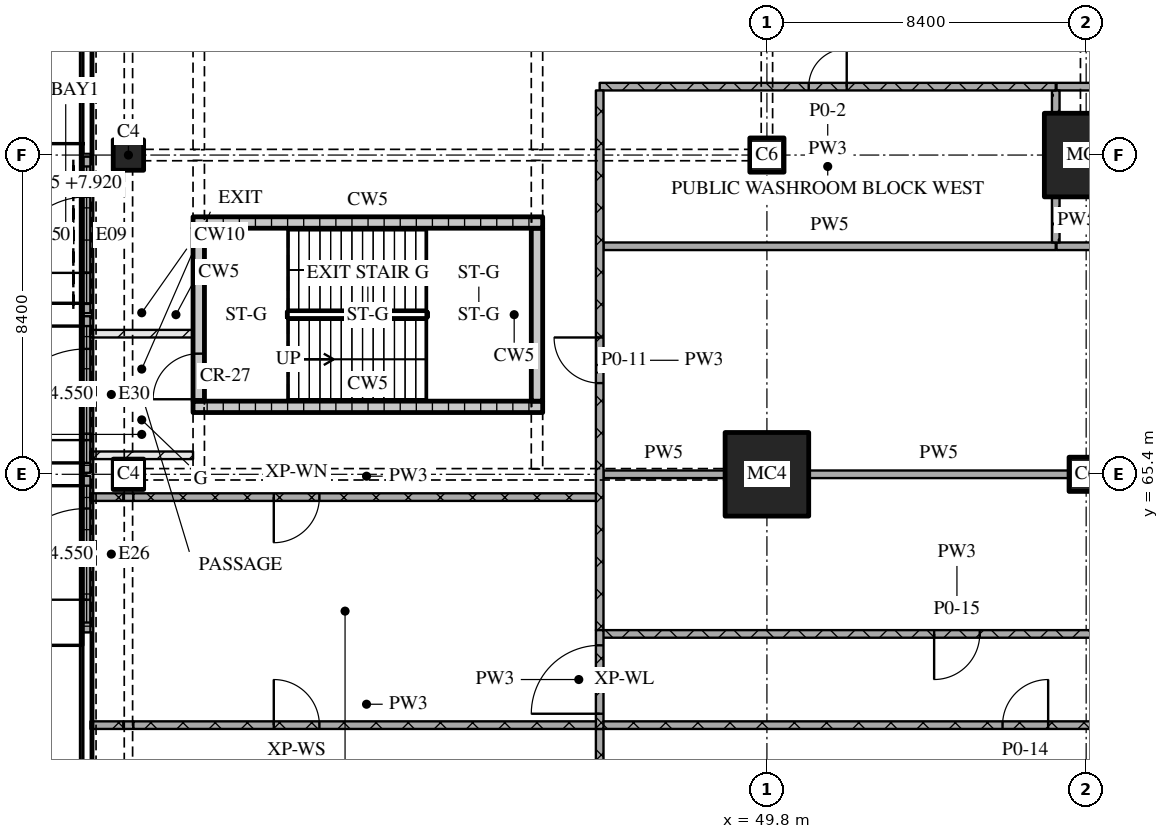
"""IFC4 building model, lengths in metres.
Left out: names, types, materials, properties, quantities, classifications, styles, units other than length and angle.
Written with IfcOpenShell. Run it as: python <this file> out.ifc"""

import sys

from ifc_helpers import new_model, si_unit, direction, frame, frame_2d, origin, origin_2d, place, context, subcontext, project, spatial, rectangle, extrude, element, fill, save


model = new_model("IFC4")
c1 = context("Model", 3, precision=1e-05, world=origin(), true_north=direction((0.0, 1.0)))
c2 = subcontext(c1, "Body", "Model", "MODEL_VIEW")
j1 = project(units=[si_unit("LENGTHUNIT", "METRE"), si_unit("PLANEANGLEUNIT", "RADIAN")], contexts=[c1])
p1 = place(None, origin())
s1 = spatial("IfcSite", under=j1, at=p1, CompositionType="ELEMENT")
p2 = place(p1, origin())
s2 = spatial("IfcBuilding", under=s1, at=p2, CompositionType="ELEMENT")
p3 = place(p2, origin())
s3 = spatial("IfcBuildingStorey", under=s2, at=p3, CompositionType="ELEMENT", Elevation=0.0)
p4 = place(p3, frame((49.8, 65.4, 0.0), z_axis=(0.0, 0.0, 1.0), x_axis=(1.0, 0.0, 0.0)))
e1 = element("IfcColumn", 1, at=p4, inside=s3, PredefinedType="COLUMN", context=c2, shape_type="SweptSolid", body=[
    extrude(rectangle(XDim=2.2, YDim=2.2, at=origin_2d()), origin(), (0.0, 0.0, 1.0), 9.0),
])
for number, where, z_axis, x_axis in (
    (2, (49.8, 73.8, 0.0), (0.0, 0.0, 1.0), (1.0, 0.0, 0.0)),
    (3, (58.2, 65.4, 0.0), (0.0, 0.0, 1.0), (1.0, 0.0, 0.0)),
):
    element("IfcColumn", number, at=place(p3, frame(where, z_axis=z_axis, x_axis=x_axis)), inside=s3, PredefinedType="COLUMN", context=c2, shape_type="SweptSolid", body=[
        extrude(rectangle(XDim=0.9, YDim=0.9, at=origin_2d()), origin(), (0.0, 0.0, 1.0), 9.0),
    ])
p5 = place(p3, frame((58.2, 73.8, 0.0), z_axis=(0.0, 0.0, 1.0), x_axis=(1.0, 0.0, 0.0)))
e4 = element("IfcColumn", 4, at=p5, inside=s3, PredefinedType="COLUMN", context=c2, shape_type="SweptSolid", body=[
    extrude(rectangle(XDim=2.2, YDim=2.2, at=origin_2d()), origin(), (0.0, 0.0, 1.0), 9.0),
])
for number, where, z_axis, x_axis in (
    (5, (33.0, 65.4, 0.0), (0.0, 0.0, 1.0), (1.0, 0.0, 0.0)),
    (6, (33.0, 73.8, 0.0), (0.0, 0.0, 1.0), (1.0, 0.0, 0.0)),
):
    element("IfcColumn", number, at=place(p3, frame(where, z_axis=z_axis, x_axis=x_axis)), inside=s3, PredefinedType="COLUMN", context=c2, shape_type="SweptSolid", body=[
        extrude(rectangle(XDim=0.8, YDim=0.8, at=origin_2d()), origin(), (0.0, 0.0, 1.0), 9.0),
    ])
p6 = place(p3, frame((31.9, 69.64, 0.0), z_axis=(0.0, 0.0, 1.0), x_axis=(0.0, 1.0, 0.0)))
e7 = element("IfcWall", 7, at=p6, inside=s3, PredefinedType="SOLIDWALL", context=c2, shape_type="SweptSolid", body=[
    extrude(rectangle(XDim=4.12, YDim=0.2, at=frame_2d((2.06, 0.0))), origin(), (0.0, 0.0, 1.0), 8.7),
])
p7 = place(p6, frame((1.06, 0.0, 0.0)))
e8 = element("IfcOpeningElement", 8, at=p7, cuts=e7, PredefinedType="OPENING", context=c2, shape_type="SweptSolid", body=[
    extrude(rectangle(XDim=2.0, YDim=2.4, at=frame_2d((1.0, 1.2))), frame((0.0, 0.11, 0.0), z_axis=(0.0, -1.0, 0.0), x_axis=(1.0, 0.0, 0.0)), (0.0, 0.0, 1.0), 0.22),
])
p8 = place(p6, frame((0.26, 0.0, 2.7)))
e9 = element("IfcOpeningElement", 9, at=p8, cuts=e7, PredefinedType="OPENING", context=c2, shape_type="SweptSolid", body=[
    extrude(rectangle(XDim=3.6, YDim=5.6, at=frame_2d((1.8, 2.8))), frame((0.0, 0.11, 0.0), z_axis=(0.0, -1.0, 0.0), x_axis=(1.0, 0.0, 0.0)), (0.0, 0.0, 1.0), 0.22),
])
p9 = place(p3, frame((31.9, 61.24, 0.0), z_axis=(0.0, 0.0, 1.0), x_axis=(0.0, 1.0, 0.0)))
e10 = element("IfcWall", 10, at=p9, inside=s3, PredefinedType="SOLIDWALL", context=c2, shape_type="SweptSolid", body=[
    extrude(rectangle(XDim=4.12, YDim=0.2, at=frame_2d((2.06, 0.0))), origin(), (0.0, 0.0, 1.0), 8.7),
])
p10 = place(p9, frame((0.86, 0.0, 0.0)))
e11 = element("IfcOpeningElement", 11, at=p10, cuts=e10, PredefinedType="OPENING", context=c2, shape_type="SweptSolid", body=[
    extrude(rectangle(XDim=2.4, YDim=2.4, at=frame_2d((1.2, 1.2))), frame((0.0, 0.11, 0.0), z_axis=(0.0, -1.0, 0.0), x_axis=(1.0, 0.0, 0.0)), (0.0, 0.0, 1.0), 0.22),
])
p11 = place(p9, frame((0.26, 0.0, 2.7)))
e12 = element("IfcOpeningElement", 12, at=p11, cuts=e10, PredefinedType="OPENING", context=c2, shape_type="SweptSolid", body=[
    extrude(rectangle(XDim=3.6, YDim=5.6, at=frame_2d((1.8, 2.8))), frame((0.0, 0.11, 0.0), z_axis=(0.0, -1.0, 0.0), x_axis=(1.0, 0.0, 0.0)), (0.0, 0.0, 1.0), 0.22),
])
p12 = place(p3, frame((31.9, 65.44, 0.0), z_axis=(0.0, 0.0, 1.0), x_axis=(0.0, 1.0, 0.0)))
e13 = element("IfcWall", 13, at=p12, inside=s3, PredefinedType="SOLIDWALL", context=c2, shape_type="SweptSolid", body=[
    extrude(rectangle(XDim=4.12, YDim=0.2, at=frame_2d((2.06, 0.0))), origin(), (0.0, 0.0, 1.0), 8.7),
])
p13 = place(p12, frame((0.86, 0.0, 0.0)))
e14 = element("IfcOpeningElement", 14, at=p13, cuts=e13, PredefinedType="OPENING", context=c2, shape_type="SweptSolid", body=[
    extrude(rectangle(XDim=2.4, YDim=2.4, at=frame_2d((1.2, 1.2))), frame((0.0, 0.11, 0.0), z_axis=(0.0, -1.0, 0.0), x_axis=(1.0, 0.0, 0.0)), (0.0, 0.0, 1.0), 0.22),
])
p14 = place(p12, frame((0.26, 0.0, 2.7)))
e15 = element("IfcOpeningElement", 15, at=p14, cuts=e13, PredefinedType="OPENING", context=c2, shape_type="SweptSolid", body=[
    extrude(rectangle(XDim=3.6, YDim=5.6, at=frame_2d((1.8, 2.8))), frame((0.0, 0.11, 0.0), z_axis=(0.0, -1.0, 0.0), x_axis=(1.0, 0.0, 0.0)), (0.0, 0.0, 1.0), 0.22),
])
p15 = place(p3, frame((34.7, 67.175, 0.0), z_axis=(0.0, 0.0, 1.0), x_axis=(1.0, 0.0, 0.0)))
e16 = element("IfcWall", 16, at=p15, inside=s3, PredefinedType="SOLIDWALL", context=c2, shape_type="SweptSolid", body=[
    extrude(rectangle(XDim=9.2, YDim=0.3, at=frame_2d((4.6, 0.0))), origin(), (0.0, 0.0, 1.0), 8.7),
])
p16 = place(p3, frame((34.85, 67.325, 0.0), z_axis=(0.0, 0.0, 1.0), x_axis=(0.0, 1.0, 0.0)))
e17 = element("IfcWall", 17, at=p16, inside=s3, PredefinedType="SOLIDWALL", context=c2, shape_type="SweptSolid", body=[
    extrude(rectangle(XDim=4.55, YDim=0.3, at=frame_2d((2.275, 0.0))), origin(), (0.0, 0.0, 1.0), 8.7),
])
p17 = place(p16, frame((0.05, 0.0, 0.0)))
e18 = element("IfcOpeningElement", 18, at=p17, cuts=e17, PredefinedType="OPENING", context=c2, shape_type="SweptSolid", body=[
    extrude(rectangle(XDim=1.2, YDim=2.1, at=frame_2d((0.6, 1.05))), frame((0.0, 0.16, 0.0), z_axis=(0.0, -1.0, 0.0), x_axis=(1.0, 0.0, 0.0)), (0.0, 0.0, 1.0), 0.32),
])
p18 = place(p3, frame((43.75, 67.325, 0.0), z_axis=(0.0, 0.0, 1.0), x_axis=(0.0, 1.0, 0.0)))
e19 = element("IfcWall", 19, at=p18, inside=s3, PredefinedType="SOLIDWALL", context=c2, shape_type="SweptSolid", body=[
    extrude(rectangle(XDim=4.55, YDim=0.3, at=frame_2d((2.275, 0.0))), origin(), (0.0, 0.0, 1.0), 8.7),
])
p19 = place(p3, frame((34.7, 72.025, 0.0), z_axis=(0.0, 0.0, 1.0), x_axis=(1.0, 0.0, 0.0)))
e20 = element("IfcWall", 20, at=p19, inside=s3, PredefinedType="SOLIDWALL", context=c2, shape_type="SweptSolid", body=[
    extrude(rectangle(XDim=9.2, YDim=0.3, at=frame_2d((4.6, 0.0))), origin(), (0.0, 0.0, 1.0), 8.7),
])
for number, where, z_axis, x_axis in (
    (21, (32.0, 65.9, 0.0), (0.0, 0.0, 1.0), (1.0, 0.0, 0.0)),
    (22, (32.0, 69.1, 0.0), (0.0, 0.0, 1.0), (1.0, 0.0, 0.0)),
):
    element("IfcWall", number, at=place(p3, frame(where, z_axis=z_axis, x_axis=x_axis)), inside=s3, PredefinedType="PARTITIONING", context=c2, shape_type="SweptSolid", body=[
        extrude(rectangle(XDim=2.7, YDim=0.2, at=frame_2d((1.35, 0.0))), origin(), (0.0, 0.0, 1.0), 8.7),
    ])
p20 = place(p3, frame((32.0, 58.8, 0.0), z_axis=(0.0, 0.0, 1.0), x_axis=(1.0, 0.0, 0.0)))
e23 = element("IfcWall", 23, at=p20, inside=s3, PredefinedType="PARTITIONING", context=c2, shape_type="SweptSolid", body=[
    extrude(rectangle(XDim=0.87, YDim=0.2, at=frame_2d((0.435, 0.0))), origin(), (0.0, 0.0, 1.0), 8.7),
])
p21 = place(p3, frame((32.87, 58.8, 0.0), z_axis=(0.0, 0.0, 1.0), x_axis=(1.0, 0.0, 0.0)))
e24 = element("IfcWall", 24, at=p21, inside=s3, PredefinedType="PARTITIONING", context=c2, shape_type="SweptSolid", body=[
    extrude(rectangle(XDim=0.26, YDim=0.2, at=frame_2d((0.13, 0.0))), origin(), (0.0, 0.0, 1.0), 8.1),
])
p22 = place(p3, frame((33.13, 58.8, 0.0), z_axis=(0.0, 0.0, 1.0), x_axis=(1.0, 0.0, 0.0)))
e25 = element("IfcWall", 25, at=p22, inside=s3, PredefinedType="PARTITIONING", context=c2, shape_type="SweptSolid", body=[
    extrude(rectangle(XDim=12.27, YDim=0.2, at=frame_2d((6.135, 0.0))), origin(), (0.0, 0.0, 1.0), 8.7),
])
p23 = place(p22, frame((3.695, 0.0, 0.0)))
e26 = element("IfcOpeningElement", 26, at=p23, cuts=e25, PredefinedType="OPENING", context=c2, shape_type="SweptSolid", body=[
    extrude(rectangle(XDim=1.2, YDim=2.1, at=frame_2d((0.6, 1.05))), frame((0.0, 0.11, 0.0), z_axis=(0.0, -1.0, 0.0), x_axis=(1.0, 0.0, 0.0)), (0.0, 0.0, 1.0), 0.22),
])
p24 = place(p3, frame((32.0, 64.8, 0.0), z_axis=(0.0, 0.0, 1.0), x_axis=(1.0, 0.0, 0.0)))
e27 = element("IfcWall", 27, at=p24, inside=s3, PredefinedType="PARTITIONING", context=c2, shape_type="SweptSolid", body=[
    extrude(rectangle(XDim=0.87, YDim=0.2, at=frame_2d((0.435, 0.0))), origin(), (0.0, 0.0, 1.0), 8.7),
])
p25 = place(p3, frame((32.87, 64.8, 0.0), z_axis=(0.0, 0.0, 1.0), x_axis=(1.0, 0.0, 0.0)))
e28 = element("IfcWall", 28, at=p25, inside=s3, PredefinedType="PARTITIONING", context=c2, shape_type="SweptSolid", body=[
    extrude(rectangle(XDim=0.26, YDim=0.2, at=frame_2d((0.13, 0.0))), origin(), (0.0, 0.0, 1.0), 8.1),
])
p26 = place(p3, frame((33.13, 64.8, 0.0), z_axis=(0.0, 0.0, 1.0), x_axis=(1.0, 0.0, 0.0)))
e29 = element("IfcWall", 29, at=p26, inside=s3, PredefinedType="PARTITIONING", context=c2, shape_type="SweptSolid", body=[
    extrude(rectangle(XDim=12.27, YDim=0.2, at=frame_2d((6.135, 0.0))), origin(), (0.0, 0.0, 1.0), 8.7),
])
p27 = place(p26, frame((3.695, 0.0, 0.0)))
e30 = element("IfcOpeningElement", 30, at=p27, cuts=e29, PredefinedType="OPENING", context=c2, shape_type="SweptSolid", body=[
    extrude(rectangle(XDim=1.2, YDim=2.1, at=frame_2d((0.6, 1.05))), frame((0.0, 0.11, 0.0), z_axis=(0.0, -1.0, 0.0), x_axis=(1.0, 0.0, 0.0)), (0.0, 0.0, 1.0), 0.22),
])
p28 = place(p3, frame((73.8, 58.8, 0.0), z_axis=(0.0, 0.0, 1.0), x_axis=(-1.0, 0.0, 0.0)))
e31 = element("IfcWall", 31, at=p28, inside=s3, PredefinedType="PARTITIONING", context=c2, shape_type="SweptSolid", body=[
    extrude(rectangle(XDim=28.4, YDim=0.2, at=frame_2d((14.2, 0.0))), origin(), (0.0, 0.0, 1.0), 8.7),
])
p29 = place(p28, frame((16.6, 0.0, 0.0)))
e32 = element("IfcOpeningElement", 32, at=p29, cuts=e31, PredefinedType="OPENING", context=c2, shape_type="SweptSolid", body=[
    extrude(rectangle(XDim=1.2, YDim=2.1, at=frame_2d((0.6, 1.05))), frame((0.0, 0.11, 0.0), z_axis=(0.0, -1.0, 0.0), x_axis=(1.0, 0.0, 0.0)), (0.0, 0.0, 1.0), 0.22),
])
p30 = place(p3, frame((45.4, 61.2, 0.0), z_axis=(0.0, 0.0, 1.0), x_axis=(1.0, 0.0, 0.0)))
e33 = element("IfcWall", 33, at=p30, inside=s3, PredefinedType="PARTITIONING", context=c2, shape_type="SweptSolid", body=[
    extrude(rectangle(XDim=18.8, YDim=0.2, at=frame_2d((9.4, 0.0))), origin(), (0.0, 0.0, 1.0), 8.7),
])
p31 = place(p30, frame((8.8, 0.0, 0.0)))
e34 = element("IfcOpeningElement", 34, at=p31, cuts=e33, PredefinedType="OPENING", context=c2, shape_type="SweptSolid", body=[
    extrude(rectangle(XDim=1.2, YDim=2.1, at=frame_2d((0.6, 1.05))), frame((0.0, 0.11, 0.0), z_axis=(0.0, -1.0, 0.0), x_axis=(1.0, 0.0, 0.0)), (0.0, 0.0, 1.0), 0.22),
])
p32 = place(p3, frame((45.5, 65.4, 0.0), z_axis=(0.0, 0.0, 1.0), x_axis=(1.0, 0.0, 0.0)))
e35 = element("IfcWall", 35, at=p32, inside=s3, PredefinedType="PARTITIONING", context=c2, shape_type="SweptSolid", body=[
    extrude(rectangle(XDim=3.18, YDim=0.2, at=frame_2d((1.59, 0.0))), origin(), (0.0, 0.0, 1.0), 7.71),
])
p33 = place(p3, frame((50.92, 65.4, 0.0), z_axis=(0.0, 0.0, 1.0), x_axis=(1.0, 0.0, 0.0)))
e36 = element("IfcWall", 36, at=p33, inside=s3, PredefinedType="PARTITIONING", context=c2, shape_type="SweptSolid", body=[
    extrude(rectangle(XDim=6.81, YDim=0.2, at=frame_2d((3.405, 0.0))), origin(), (0.0, 0.0, 1.0), 8.7),
])
p34 = place(p3, frame((57.42, 71.4, 0.0), z_axis=(0.0, 0.0, 1.0), x_axis=(1.0, 0.0, 0.0)))
e37 = element("IfcWall", 37, at=p34, inside=s3, PredefinedType="PARTITIONING", context=c2, shape_type="SweptSolid", body=[
    extrude(rectangle(XDim=6.76, YDim=0.2, at=frame_2d((3.38, 0.0))), origin(), (0.0, 0.0, 1.0), 8.7),
])
p35 = place(p3, frame((45.5, 71.4, 0.0), z_axis=(0.0, 0.0, 1.0), x_axis=(1.0, 0.0, 0.0)))
e38 = element("IfcWall", 38, at=p35, inside=s3, PredefinedType="PARTITIONING", context=c2, shape_type="SweptSolid", body=[
    extrude(rectangle(XDim=11.9, YDim=0.2, at=frame_2d((5.95, 0.0))), origin(), (0.0, 0.0, 1.0), 8.7),
])
p36 = place(p3, frame((57.4, 75.6, 0.0), z_axis=(0.0, 0.0, 1.0), x_axis=(-1.0, 0.0, 0.0)))
e39 = element("IfcWall", 39, at=p36, inside=s3, PredefinedType="PARTITIONING", context=c2, shape_type="SweptSolid", body=[
    extrude(rectangle(XDim=12.0, YDim=0.2, at=frame_2d((6.0, 0.0))), origin(), (0.0, 0.0, 1.0), 8.7),
])
p37 = place(p36, frame((5.5, 0.0, 0.0)))
e40 = element("IfcOpeningElement", 40, at=p37, cuts=e39, PredefinedType="OPENING", context=c2, shape_type="SweptSolid", body=[
    extrude(rectangle(XDim=1.0, YDim=2.1, at=frame_2d((0.5, 1.05))), frame((0.0, 0.11, 0.0), z_axis=(0.0, -1.0, 0.0), x_axis=(1.0, 0.0, 0.0)), (0.0, 0.0, 1.0), 0.22),
])
p38 = place(p3, frame((57.42, 75.6, 0.0), z_axis=(0.0, 0.0, 1.0), x_axis=(1.0, 0.0, 0.0)))
e41 = element("IfcWall", 41, at=p38, inside=s3, PredefinedType="PARTITIONING", context=c2, shape_type="SweptSolid", body=[
    extrude(rectangle(XDim=6.76, YDim=0.2, at=frame_2d((3.38, 0.0))), origin(), (0.0, 0.0, 1.0), 8.7),
])
p39 = place(p3, frame((45.4, 58.7, 0.0), z_axis=(0.0, 0.0, 1.0), x_axis=(0.0, -1.0, 0.0)))
e42 = element("IfcWall", 42, at=p39, inside=s3, PredefinedType="PARTITIONING", context=c2, shape_type="SweptSolid", body=[
    extrude(rectangle(XDim=24.4, YDim=0.2, at=frame_2d((12.2, 0.0))), origin(), (0.0, 0.0, 1.0), 8.7),
])
p40 = place(p39, frame((14.55, 0.0, 0.0)))
e43 = element("IfcOpeningElement", 43, at=p40, cuts=e42, PredefinedType="OPENING", context=c2, shape_type="SweptSolid", body=[
    extrude(rectangle(XDim=1.2, YDim=2.1, at=frame_2d((0.6, 1.05))), frame((0.0, 0.11, 0.0), z_axis=(0.0, -1.0, 0.0), x_axis=(1.0, 0.0, 0.0)), (0.0, 0.0, 1.0), 0.22),
])
p41 = place(p3, frame((45.4, 75.5, 0.0), z_axis=(0.0, 0.0, 1.0), x_axis=(0.0, -1.0, 0.0)))
e44 = element("IfcWall", 44, at=p41, inside=s3, PredefinedType="PARTITIONING", context=c2, shape_type="SweptSolid", body=[
    extrude(rectangle(XDim=14.2, YDim=0.2, at=frame_2d((7.1, 0.0))), origin(), (0.0, 0.0, 1.0), 8.7),
])
p42 = place(p41, frame((6.5, 0.0, 0.0)))
e45 = element("IfcOpeningElement", 45, at=p42, cuts=e44, PredefinedType="OPENING", context=c2, shape_type="SweptSolid", body=[
    extrude(rectangle(XDim=1.2, YDim=2.1, at=frame_2d((0.6, 1.05))), frame((0.0, 0.11, 0.0), z_axis=(0.0, -1.0, 0.0), x_axis=(1.0, 0.0, 0.0)), (0.0, 0.0, 1.0), 0.22),
])
p43 = place(p3, frame((57.4, 72.68, 0.0), z_axis=(0.0, 0.0, 1.0), x_axis=(0.0, -1.0, 0.0)))
e46 = element("IfcWall", 46, at=p43, inside=s3, PredefinedType="PARTITIONING", context=c2, shape_type="SweptSolid", body=[
    extrude(rectangle(XDim=1.18, YDim=0.2, at=frame_2d((0.59, 0.0))), origin(), (0.0, 0.0, 1.0), 8.7),
])
p44 = place(p3, frame((57.4, 75.5, 0.0), z_axis=(0.0, 0.0, 1.0), x_axis=(0.0, -1.0, 0.0)))
e47 = element("IfcWall", 47, at=p44, inside=s3, PredefinedType="PARTITIONING", context=c2, shape_type="SweptSolid", body=[
    extrude(rectangle(XDim=0.58, YDim=0.2, at=frame_2d((0.29, 0.0))), origin(), (0.0, 0.0, 1.0), 8.7),
])
p45 = place(p3, frame((45.4, 58.7, 0.0), z_axis=(0.0, 0.0, 1.0), x_axis=(0.0, 1.0, 0.0)))
e48 = element("IfcWall", 48, at=p45, inside=s3, PredefinedType="PARTITIONING", context=c2, shape_type="SweptSolid", body=[
    extrude(rectangle(XDim=2.6, YDim=0.2, at=frame_2d((1.3, 0.0))), origin(), (0.0, 0.0, 1.0), 8.7),
])
p46 = place(p45, frame((0.4, 0.0, 0.0)))
e49 = element("IfcOpeningElement", 49, at=p46, cuts=e48, PredefinedType="OPENING", context=c2, shape_type="SweptSolid", body=[
    extrude(rectangle(XDim=1.8, YDim=2.1, at=frame_2d((0.9, 1.05))), frame((0.0, 0.11, 0.0), z_axis=(0.0, -1.0, 0.0), x_axis=(1.0, 0.0, 0.0)), (0.0, 0.0, 1.0), 0.22),
])
p47 = place(p7, origin())
e50 = element("IfcDoor", 50, at=p47, inside=s3, OperationType="DOUBLE_DOOR_SINGLE_SWING", PredefinedType="GATE", context=c2, shape_type="SweptSolid", body=[
    extrude(rectangle(XDim=2.0, YDim=2.4, at=frame_2d((1.0, 1.2))), frame((0.0, 0.025, 0.0), z_axis=(0.0, -1.0, 0.0), x_axis=(1.0, 0.0, 0.0)), (0.0, 0.0, 1.0), 0.05),
])
fill(e8, e50)
p48 = place(p8, origin())
e51 = element("IfcWindow", 51, at=p48, inside=s3, PartitioningType="SINGLE_PANEL", PredefinedType="WINDOW", context=c2, shape_type="SweptSolid", body=[
    extrude(rectangle(XDim=3.6, YDim=5.6, at=frame_2d((1.8, 2.8))), frame((0.0, 0.03, 0.0), z_axis=(0.0, -1.0, 0.0), x_axis=(1.0, 0.0, 0.0)), (0.0, 0.0, 1.0), 0.06),
])
fill(e9, e51)
p49 = place(p10, origin())
e52 = element("IfcDoor", 52, at=p49, inside=s3, OperationType="DOUBLE_DOOR_SINGLE_SWING", PredefinedType="DOOR", context=c2, shape_type="SweptSolid", body=[
    extrude(rectangle(XDim=2.4, YDim=2.4, at=frame_2d((1.2, 1.2))), frame((0.0, 0.025, 0.0), z_axis=(0.0, -1.0, 0.0), x_axis=(1.0, 0.0, 0.0)), (0.0, 0.0, 1.0), 0.05),
])
fill(e11, e52)
p50 = place(p11, origin())
e53 = element("IfcWindow", 53, at=p50, inside=s3, PartitioningType="SINGLE_PANEL", PredefinedType="WINDOW", context=c2, shape_type="SweptSolid", body=[
    extrude(rectangle(XDim=3.6, YDim=5.6, at=frame_2d((1.8, 2.8))), frame((0.0, 0.03, 0.0), z_axis=(0.0, -1.0, 0.0), x_axis=(1.0, 0.0, 0.0)), (0.0, 0.0, 1.0), 0.06),
])
fill(e12, e53)
p51 = place(p13, origin())
e54 = element("IfcDoor", 54, at=p51, inside=s3, OperationType="DOUBLE_DOOR_SINGLE_SWING", PredefinedType="DOOR", context=c2, shape_type="SweptSolid", body=[
    extrude(rectangle(XDim=2.4, YDim=2.4, at=frame_2d((1.2, 1.2))), frame((0.0, 0.025, 0.0), z_axis=(0.0, -1.0, 0.0), x_axis=(1.0, 0.0, 0.0)), (0.0, 0.0, 1.0), 0.05),
])
fill(e14, e54)
p52 = place(p14, origin())
e55 = element("IfcWindow", 55, at=p52, inside=s3, PartitioningType="SINGLE_PANEL", PredefinedType="WINDOW", context=c2, shape_type="SweptSolid", body=[
    extrude(rectangle(XDim=3.6, YDim=5.6, at=frame_2d((1.8, 2.8))), frame((0.0, 0.03, 0.0), z_axis=(0.0, -1.0, 0.0), x_axis=(1.0, 0.0, 0.0)), (0.0, 0.0, 1.0), 0.06),
])
fill(e15, e55)
p53 = place(p17, origin())
e56 = element("IfcDoor", 56, at=p53, inside=s3, OperationType="SINGLE_SWING_LEFT", PredefinedType="DOOR", context=c2, shape_type="SweptSolid", body=[
    extrude(rectangle(XDim=1.2, YDim=2.1, at=frame_2d((0.6, 1.05))), frame((0.0, 0.025, 0.0), z_axis=(0.0, -1.0, 0.0), x_axis=(1.0, 0.0, 0.0)), (0.0, 0.0, 1.0), 0.05),
])
fill(e18, e56)
p54 = place(p23, origin())
e57 = element("IfcDoor", 57, at=p54, inside=s3, OperationType="SINGLE_SWING_LEFT", PredefinedType="DOOR", context=c2, shape_type="SweptSolid", body=[
    extrude(rectangle(XDim=1.2, YDim=2.1, at=frame_2d((0.6, 1.05))), frame((0.0, 0.025, 0.0), z_axis=(0.0, -1.0, 0.0), x_axis=(1.0, 0.0, 0.0)), (0.0, 0.0, 1.0), 0.05),
])
fill(e26, e57)
p55 = place(p27, origin())
e58 = element("IfcDoor", 58, at=p55, inside=s3, OperationType="SINGLE_SWING_RIGHT", PredefinedType="DOOR", context=c2, shape_type="SweptSolid", body=[
    extrude(rectangle(XDim=1.2, YDim=2.1, at=frame_2d((0.6, 1.05))), frame((0.0, 0.025, 0.0), z_axis=(0.0, -1.0, 0.0), x_axis=(1.0, 0.0, 0.0)), (0.0, 0.0, 1.0), 0.05),
])
fill(e30, e58)
p56 = place(p29, origin())
e59 = element("IfcDoor", 59, at=p56, inside=s3, OperationType="SINGLE_SWING_RIGHT", PredefinedType="DOOR", context=c2, shape_type="SweptSolid", body=[
    extrude(rectangle(XDim=1.2, YDim=2.1, at=frame_2d((0.6, 1.05))), frame((0.0, 0.025, 0.0), z_axis=(0.0, -1.0, 0.0), x_axis=(1.0, 0.0, 0.0)), (0.0, 0.0, 1.0), 0.05),
])
fill(e32, e59)
p57 = place(p31, origin())
e60 = element("IfcDoor", 60, at=p57, inside=s3, OperationType="SINGLE_SWING_RIGHT", PredefinedType="DOOR", context=c2, shape_type="SweptSolid", body=[
    extrude(rectangle(XDim=1.2, YDim=2.1, at=frame_2d((0.6, 1.05))), frame((0.0, 0.025, 0.0), z_axis=(0.0, -1.0, 0.0), x_axis=(1.0, 0.0, 0.0)), (0.0, 0.0, 1.0), 0.05),
])
fill(e34, e60)
p58 = place(p37, origin())
e61 = element("IfcDoor", 61, at=p58, inside=s3, OperationType="SINGLE_SWING_RIGHT", PredefinedType="DOOR", context=c2, shape_type="SweptSolid", body=[
    extrude(rectangle(XDim=1.0, YDim=2.1, at=frame_2d((0.5, 1.05))), frame((0.0, 0.025, 0.0), z_axis=(0.0, -1.0, 0.0), x_axis=(1.0, 0.0, 0.0)), (0.0, 0.0, 1.0), 0.05),
])
fill(e40, e61)
p59 = place(p42, origin())
e62 = element("IfcDoor", 62, at=p59, inside=s3, OperationType="SINGLE_SWING_RIGHT", PredefinedType="DOOR", context=c2, shape_type="SweptSolid", body=[
    extrude(rectangle(XDim=1.2, YDim=2.1, at=frame_2d((0.6, 1.05))), frame((0.0, 0.025, 0.0), z_axis=(0.0, -1.0, 0.0), x_axis=(1.0, 0.0, 0.0)), (0.0, 0.0, 1.0), 0.05),
])
fill(e45, e62)
p60 = place(p46, origin())
e63 = element("IfcDoor", 63, at=p60, inside=s3, OperationType="DOUBLE_DOOR_SINGLE_SWING", PredefinedType="DOOR", context=c2, shape_type="SweptSolid", body=[
    extrude(rectangle(XDim=1.8, YDim=2.1, at=frame_2d((0.9, 1.05))), frame((0.0, 0.025, 0.0), z_axis=(0.0, -1.0, 0.0), x_axis=(1.0, 0.0, 0.0)), (0.0, 0.0, 1.0), 0.05),
])
fill(e49, e63)
save(model, sys.argv[1])
